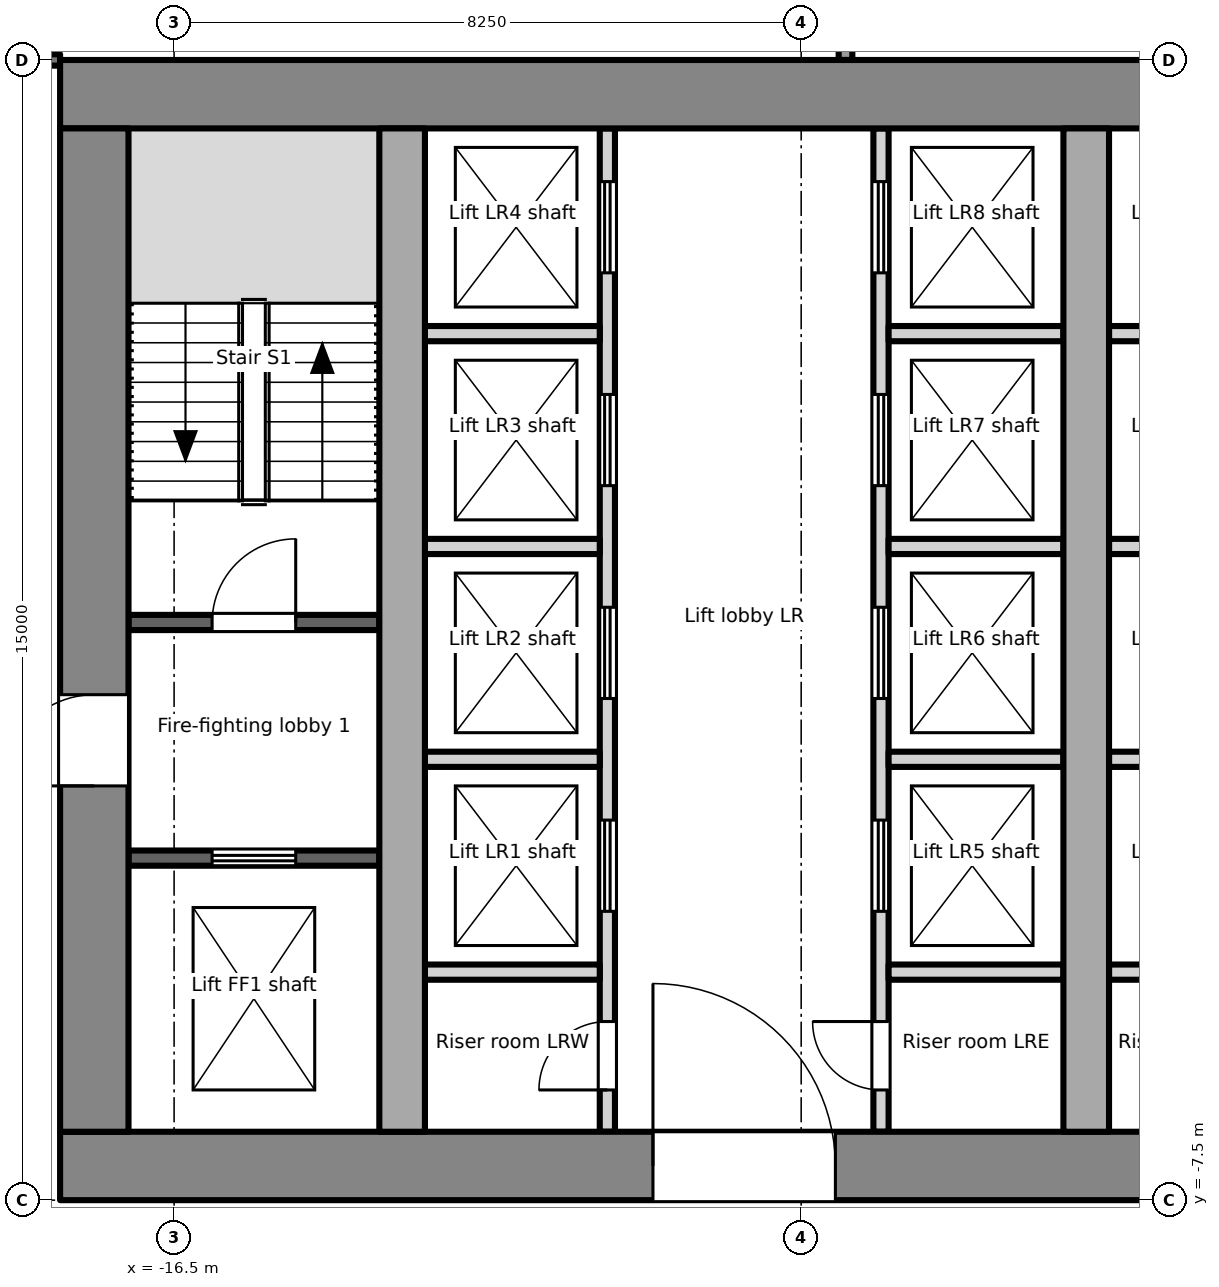
"""IFC4 building model, lengths in metres.
Left out: names, types, materials, properties, quantities, classifications, styles, units other than length and angle.
Written with IfcOpenShell. Run it as: python <this file> out.ifc"""

import sys

from ifc_helpers import new_model, si_unit, direction, frame, frame_2d, origin, place, context, subcontext, project, spatial, rectangle, extrude, element, fill, save


model = new_model("IFC4")
c1 = context("Model", 3, precision=1e-05, world=origin(), true_north=direction((0.0, 1.0)))
c2 = subcontext(c1, "Body", "Model", "MODEL_VIEW")
j1 = project(units=[si_unit("LENGTHUNIT", "METRE"), si_unit("PLANEANGLEUNIT", "RADIAN")], contexts=[c1])
p1 = place(None, origin())
s1 = spatial("IfcSite", under=j1, at=p1, CompositionType="ELEMENT")
p2 = place(p1, origin())
s2 = spatial("IfcBuilding", under=s1, at=p2, CompositionType="ELEMENT")
p3 = place(p2, frame((0.0, 0.0, 150.1)))
s3 = spatial("IfcBuildingStorey", under=s2, at=p3, CompositionType="ELEMENT", Elevation=150.1)
p4 = place(p3, frame((-18.0, -7.05, -0.2), z_axis=(0.0, 0.0, 1.0), x_axis=(1.0, 0.0, 0.0)))
e1 = element("IfcWall", 1, at=p4, inside=s3, PredefinedType="SHEAR", context=c2, shape_type="SweptSolid", body=[
    extrude(rectangle(XDim=36.0, YDim=0.9, at=frame_2d((18.0, 0.0))), origin(), (0.0, 0.0, 1.0), 4.0),
])
p5 = place(p4, frame((7.8, 0.0, 0.2)))
e2 = element("IfcOpeningElement", 2, at=p5, cuts=e1, PredefinedType="OPENING", context=c2, shape_type="SweptSolid", body=[
    extrude(rectangle(XDim=2.4, YDim=2.1, at=frame_2d((1.2, 1.05))), frame((0.0, 0.46, 0.0), z_axis=(0.0, -1.0, 0.0), x_axis=(1.0, 0.0, 0.0)), (0.0, 0.0, 1.0), 0.921),
])
p6 = place(p4, frame((17.4, 0.0, 0.2)))
e3 = element("IfcOpeningElement", 3, at=p6, cuts=e1, PredefinedType="OPENING", context=c2, shape_type="SweptSolid", body=[
    extrude(rectangle(XDim=1.2, YDim=2.1, at=frame_2d((0.6, 1.05))), frame((0.0, 0.46, 0.0), z_axis=(0.0, -1.0, 0.0), x_axis=(1.0, 0.0, 0.0)), (0.0, 0.0, 1.0), 0.921),
])
p7 = place(p4, frame((26.1, 0.0, 0.2)))
e4 = element("IfcOpeningElement", 4, at=p7, cuts=e1, PredefinedType="OPENING", context=c2, shape_type="SweptSolid", body=[
    extrude(rectangle(XDim=2.4, YDim=2.1, at=frame_2d((1.2, 1.05))), frame((0.0, 0.46, 0.0), z_axis=(0.0, -1.0, 0.0), x_axis=(1.0, 0.0, 0.0)), (0.0, 0.0, 1.0), 0.921),
])
p8 = place(p3, frame((-18.0, 7.05, -0.2), z_axis=(0.0, 0.0, 1.0), x_axis=(1.0, 0.0, 0.0)))
e5 = element("IfcWall", 5, at=p8, inside=s3, PredefinedType="SHEAR", context=c2, shape_type="SweptSolid", body=[
    extrude(rectangle(XDim=36.0, YDim=0.9, at=frame_2d((18.0, 0.0))), origin(), (0.0, 0.0, 1.0), 4.0),
])
p9 = place(p3, frame((-17.55, -6.6, -0.2), z_axis=(0.0, 0.0, 1.0), x_axis=(0.0, 1.0, 0.0)))
e6 = element("IfcWall", 6, at=p9, inside=s3, PredefinedType="SHEAR", context=c2, shape_type="SweptSolid", body=[
    extrude(rectangle(XDim=13.2, YDim=0.9, at=frame_2d((6.6, 0.0))), origin(), (0.0, 0.0, 1.0), 4.0),
])
p10 = place(p9, frame((4.55, 0.0, 0.2)))
e7 = element("IfcOpeningElement", 7, at=p10, cuts=e6, PredefinedType="OPENING", context=c2, shape_type="SweptSolid", body=[
    extrude(rectangle(XDim=1.2, YDim=2.1, at=frame_2d((0.6, 1.05))), frame((0.0, 0.46, 0.0), z_axis=(0.0, -1.0, 0.0), x_axis=(1.0, 0.0, 0.0)), (0.0, 0.0, 1.0), 0.921),
])
for number, where, z_axis, x_axis in (
    (8, (-13.5, -6.6, -0.2), (0.0, 0.0, 1.0), (0.0, 1.0, 0.0)),
    (9, (-4.5, -6.6, -0.2), (0.0, 0.0, 1.0), (0.0, 1.0, 0.0)),
):
    element("IfcWall", number, at=place(p3, frame(where, z_axis=z_axis, x_axis=x_axis)), inside=s3, PredefinedType="SHEAR", context=c2, shape_type="SweptSolid", body=[
        extrude(rectangle(XDim=13.2, YDim=0.6, at=frame_2d((6.6, 0.0))), origin(), (0.0, 0.0, 1.0), 4.0),
    ])
p11 = place(p3, frame((-17.1, -3.0, 0.0), z_axis=(0.0, 0.0, 1.0), x_axis=(1.0, 0.0, 0.0)))
e10 = element("IfcWall", 10, at=p11, inside=s3, PredefinedType="PARTITIONING", context=c2, shape_type="SweptSolid", body=[
    extrude(rectangle(XDim=3.3, YDim=0.2, at=frame_2d((1.65, 0.0))), origin(), (0.0, 0.0, 1.0), 3.8),
])
p12 = place(p11, frame((1.1, 0.0, 0.0)))
e11 = element("IfcOpeningElement", 11, at=p12, cuts=e10, PredefinedType="OPENING", context=c2, shape_type="SweptSolid", body=[
    extrude(rectangle(XDim=1.1, YDim=2.1, at=frame_2d((0.55, 1.05))), frame((0.0, 0.111, 0.0), z_axis=(0.0, -1.0, 0.0), x_axis=(1.0, 0.0, 0.0)), (0.0, 0.0, 1.0), 0.221),
])
p13 = place(p3, frame((-17.1, 0.1, 0.0), z_axis=(0.0, 0.0, 1.0), x_axis=(1.0, 0.0, 0.0)))
e12 = element("IfcWall", 12, at=p13, inside=s3, PredefinedType="PARTITIONING", context=c2, shape_type="SweptSolid", body=[
    extrude(rectangle(XDim=3.3, YDim=0.2, at=frame_2d((1.65, 0.0))), origin(), (0.0, 0.0, 1.0), 3.8),
])
p14 = place(p13, frame((1.1, 0.0, 0.0)))
e13 = element("IfcOpeningElement", 13, at=p14, cuts=e12, PredefinedType="OPENING", context=c2, shape_type="SweptSolid", body=[
    extrude(rectangle(XDim=1.1, YDim=2.1, at=frame_2d((0.55, 1.05))), frame((0.0, 0.111, 0.0), z_axis=(0.0, -1.0, 0.0), x_axis=(1.0, 0.0, 0.0)), (0.0, 0.0, 1.0), 0.221),
])
p15 = place(p3, frame((-10.8, -6.6, 0.0), z_axis=(0.0, 0.0, 1.0), x_axis=(0.0, 1.0, 0.0)))
e14 = element("IfcWall", 14, at=p15, inside=s3, PredefinedType="PARTITIONING", context=c2, shape_type="SweptSolid", body=[
    extrude(rectangle(XDim=13.2, YDim=0.2, at=frame_2d((6.6, 0.0))), origin(), (0.0, 0.0, 1.0), 3.8),
])
p16 = place(p15, frame((0.55, 0.0, 0.0)))
e15 = element("IfcOpeningElement", 15, at=p16, cuts=e14, PredefinedType="OPENING", context=c2, shape_type="SweptSolid", body=[
    extrude(rectangle(XDim=0.9, YDim=2.1, at=frame_2d((0.45, 1.05))), frame((0.0, 0.111, 0.0), z_axis=(0.0, -1.0, 0.0), x_axis=(1.0, 0.0, 0.0)), (0.0, 0.0, 1.0), 0.221),
])
p17 = place(p15, frame((2.9, 0.0, 0.0)))
e16 = element("IfcOpeningElement", 16, at=p17, cuts=e14, PredefinedType="OPENING", context=c2, shape_type="SweptSolid", body=[
    extrude(rectangle(XDim=1.2, YDim=2.1, at=frame_2d((0.6, 1.05))), frame((0.0, 0.111, 0.0), z_axis=(0.0, -1.0, 0.0), x_axis=(1.0, 0.0, 0.0)), (0.0, 0.0, 1.0), 0.221),
])
p18 = place(p15, frame((5.7, 0.0, 0.0)))
e17 = element("IfcOpeningElement", 17, at=p18, cuts=e14, PredefinedType="OPENING", context=c2, shape_type="SweptSolid", body=[
    extrude(rectangle(XDim=1.2, YDim=2.1, at=frame_2d((0.6, 1.05))), frame((0.0, 0.111, 0.0), z_axis=(0.0, -1.0, 0.0), x_axis=(1.0, 0.0, 0.0)), (0.0, 0.0, 1.0), 0.221),
])
p19 = place(p15, frame((8.5, 0.0, 0.0)))
e18 = element("IfcOpeningElement", 18, at=p19, cuts=e14, PredefinedType="OPENING", context=c2, shape_type="SweptSolid", body=[
    extrude(rectangle(XDim=1.2, YDim=2.1, at=frame_2d((0.6, 1.05))), frame((0.0, 0.111, 0.0), z_axis=(0.0, -1.0, 0.0), x_axis=(1.0, 0.0, 0.0)), (0.0, 0.0, 1.0), 0.221),
])
p20 = place(p15, frame((11.3, 0.0, 0.0)))
e19 = element("IfcOpeningElement", 19, at=p20, cuts=e14, PredefinedType="OPENING", context=c2, shape_type="SweptSolid", body=[
    extrude(rectangle(XDim=1.2, YDim=2.1, at=frame_2d((0.6, 1.05))), frame((0.0, 0.111, 0.0), z_axis=(0.0, -1.0, 0.0), x_axis=(1.0, 0.0, 0.0)), (0.0, 0.0, 1.0), 0.221),
])
p21 = place(p3, frame((-7.2, -6.6, 0.0), z_axis=(0.0, 0.0, 1.0), x_axis=(0.0, 1.0, 0.0)))
e20 = element("IfcWall", 20, at=p21, inside=s3, PredefinedType="PARTITIONING", context=c2, shape_type="SweptSolid", body=[
    extrude(rectangle(XDim=13.2, YDim=0.2, at=frame_2d((6.6, 0.0))), origin(), (0.0, 0.0, 1.0), 3.8),
])
p22 = place(p21, frame((0.55, 0.0, 0.0)))
e21 = element("IfcOpeningElement", 21, at=p22, cuts=e20, PredefinedType="OPENING", context=c2, shape_type="SweptSolid", body=[
    extrude(rectangle(XDim=0.9, YDim=2.1, at=frame_2d((0.45, 1.05))), frame((0.0, 0.111, 0.0), z_axis=(0.0, -1.0, 0.0), x_axis=(1.0, 0.0, 0.0)), (0.0, 0.0, 1.0), 0.221),
])
p23 = place(p21, frame((2.9, 0.0, 0.0)))
e22 = element("IfcOpeningElement", 22, at=p23, cuts=e20, PredefinedType="OPENING", context=c2, shape_type="SweptSolid", body=[
    extrude(rectangle(XDim=1.2, YDim=2.1, at=frame_2d((0.6, 1.05))), frame((0.0, 0.111, 0.0), z_axis=(0.0, -1.0, 0.0), x_axis=(1.0, 0.0, 0.0)), (0.0, 0.0, 1.0), 0.221),
])
p24 = place(p21, frame((5.7, 0.0, 0.0)))
e23 = element("IfcOpeningElement", 23, at=p24, cuts=e20, PredefinedType="OPENING", context=c2, shape_type="SweptSolid", body=[
    extrude(rectangle(XDim=1.2, YDim=2.1, at=frame_2d((0.6, 1.05))), frame((0.0, 0.111, 0.0), z_axis=(0.0, -1.0, 0.0), x_axis=(1.0, 0.0, 0.0)), (0.0, 0.0, 1.0), 0.221),
])
p25 = place(p21, frame((8.5, 0.0, 0.0)))
e24 = element("IfcOpeningElement", 24, at=p25, cuts=e20, PredefinedType="OPENING", context=c2, shape_type="SweptSolid", body=[
    extrude(rectangle(XDim=1.2, YDim=2.1, at=frame_2d((0.6, 1.05))), frame((0.0, 0.111, 0.0), z_axis=(0.0, -1.0, 0.0), x_axis=(1.0, 0.0, 0.0)), (0.0, 0.0, 1.0), 0.221),
])
p26 = place(p21, frame((11.3, 0.0, 0.0)))
e25 = element("IfcOpeningElement", 25, at=p26, cuts=e20, PredefinedType="OPENING", context=c2, shape_type="SweptSolid", body=[
    extrude(rectangle(XDim=1.2, YDim=2.1, at=frame_2d((0.6, 1.05))), frame((0.0, 0.111, 0.0), z_axis=(0.0, -1.0, 0.0), x_axis=(1.0, 0.0, 0.0)), (0.0, 0.0, 1.0), 0.221),
])
for number, where, z_axis, x_axis in (
    (26, (-13.2, -1.7, 0.0), (0.0, 0.0, 1.0), (1.0, 0.0, 0.0)),
    (27, (-13.2, 1.1, 0.0), (0.0, 0.0, 1.0), (1.0, 0.0, 0.0)),
    (28, (-13.2, 3.9, 0.0), (0.0, 0.0, 1.0), (1.0, 0.0, 0.0)),
    (29, (-13.2, -4.5, 0.0), (0.0, 0.0, 1.0), (1.0, 0.0, 0.0)),
    (30, (-7.1, -1.7, 0.0), (0.0, 0.0, 1.0), (1.0, 0.0, 0.0)),
    (31, (-7.1, 1.1, 0.0), (0.0, 0.0, 1.0), (1.0, 0.0, 0.0)),
    (32, (-7.1, 3.9, 0.0), (0.0, 0.0, 1.0), (1.0, 0.0, 0.0)),
    (33, (-7.1, -4.5, 0.0), (0.0, 0.0, 1.0), (1.0, 0.0, 0.0)),
    (34, (-4.2, -1.7, 0.0), (0.0, 0.0, 1.0), (1.0, 0.0, 0.0)),
    (35, (-4.2, 1.1, 0.0), (0.0, 0.0, 1.0), (1.0, 0.0, 0.0)),
    (36, (-4.2, 3.9, 0.0), (0.0, 0.0, 1.0), (1.0, 0.0, 0.0)),
    (37, (-4.2, -4.5, 0.0), (0.0, 0.0, 1.0), (1.0, 0.0, 0.0)),
):
    element("IfcWall", number, at=place(p3, frame(where, z_axis=z_axis, x_axis=x_axis)), inside=s3, PredefinedType="PARTITIONING", context=c2, shape_type="SweptSolid", body=[
        extrude(rectangle(XDim=2.3, YDim=0.2, at=frame_2d((1.15, 0.0))), origin(), (0.0, 0.0, 1.0), 3.8),
    ])
p27 = place(p3, frame((-20.325, 7.501, 0.0), z_axis=(0.0, 0.0, 1.0), x_axis=(1.0, 0.0, 0.0)))
e38 = element("IfcWall", 38, at=p27, inside=s3, PredefinedType="PARTITIONING", context=c2, shape_type="SweptSolid", body=[
    extrude(rectangle(XDim=2.325, YDim=0.15, at=frame_2d((1.163, 0.0))), origin(), (0.0, 0.0, 1.0), 3.8),
])
p28 = place(p3, frame((-7.667, 12.24, 0.0), z_axis=(0.0, 0.0, 1.0), x_axis=(0.0, -1.0, 0.0)))
e39 = element("IfcWall", 39, at=p28, inside=s3, PredefinedType="PARTITIONING", context=c2, shape_type="SweptSolid", body=[
    extrude(rectangle(XDim=4.74, YDim=0.18, at=frame_2d((2.37, 0.0))), origin(), (0.0, 0.0, 1.0), 3.8),
])
p29 = place(p12, origin())
e40 = element("IfcDoor", 40, at=p29, inside=s3, OperationType="DOUBLE_DOOR_SLIDING", PredefinedType="DOOR", context=c2, shape_type="SweptSolid", body=[
    extrude(rectangle(XDim=1.1, YDim=2.1, at=frame_2d((0.55, 1.05))), frame((0.0, 0.025, 0.0), z_axis=(0.0, -1.0, 0.0), x_axis=(1.0, 0.0, 0.0)), (0.0, 0.0, 1.0), 0.05),
])
fill(e11, e40)
p30 = place(p10, origin())
e41 = element("IfcDoor", 41, at=p30, inside=s3, OperationType="SINGLE_SWING_LEFT", PredefinedType="DOOR", context=c2, shape_type="SweptSolid", body=[
    extrude(rectangle(XDim=1.2, YDim=2.1, at=frame_2d((0.6, 1.05))), frame((0.0, 0.025, 0.0), z_axis=(0.0, -1.0, 0.0), x_axis=(1.0, 0.0, 0.0)), (0.0, 0.0, 1.0), 0.05),
])
fill(e7, e41)
p31 = place(p14, origin())
e42 = element("IfcDoor", 42, at=p31, inside=s3, OperationType="SINGLE_SWING_RIGHT", PredefinedType="DOOR", context=c2, shape_type="SweptSolid", body=[
    extrude(rectangle(XDim=1.1, YDim=2.1, at=frame_2d((0.55, 1.05))), frame((0.0, 0.025, 0.0), z_axis=(0.0, -1.0, 0.0), x_axis=(1.0, 0.0, 0.0)), (0.0, 0.0, 1.0), 0.05),
])
fill(e13, e42)
p32 = place(p16, origin())
e43 = element("IfcDoor", 43, at=p32, inside=s3, OperationType="SINGLE_SWING_LEFT", PredefinedType="DOOR", context=c2, shape_type="SweptSolid", body=[
    extrude(rectangle(XDim=0.9, YDim=2.1, at=frame_2d((0.45, 1.05))), frame((0.0, 0.025, 0.0), z_axis=(0.0, -1.0, 0.0), x_axis=(1.0, 0.0, 0.0)), (0.0, 0.0, 1.0), 0.05),
])
fill(e15, e43)
p33 = place(p17, origin())
e44 = element("IfcDoor", 44, at=p33, inside=s3, OperationType="DOUBLE_DOOR_SLIDING", PredefinedType="DOOR", context=c2, shape_type="SweptSolid", body=[
    extrude(rectangle(XDim=1.2, YDim=2.1, at=frame_2d((0.6, 1.05))), frame((0.0, 0.025, 0.0), z_axis=(0.0, -1.0, 0.0), x_axis=(1.0, 0.0, 0.0)), (0.0, 0.0, 1.0), 0.05),
])
fill(e16, e44)
p34 = place(p18, origin())
e45 = element("IfcDoor", 45, at=p34, inside=s3, OperationType="DOUBLE_DOOR_SLIDING", PredefinedType="DOOR", context=c2, shape_type="SweptSolid", body=[
    extrude(rectangle(XDim=1.2, YDim=2.1, at=frame_2d((0.6, 1.05))), frame((0.0, 0.025, 0.0), z_axis=(0.0, -1.0, 0.0), x_axis=(1.0, 0.0, 0.0)), (0.0, 0.0, 1.0), 0.05),
])
fill(e17, e45)
p35 = place(p19, origin())
e46 = element("IfcDoor", 46, at=p35, inside=s3, OperationType="DOUBLE_DOOR_SLIDING", PredefinedType="DOOR", context=c2, shape_type="SweptSolid", body=[
    extrude(rectangle(XDim=1.2, YDim=2.1, at=frame_2d((0.6, 1.05))), frame((0.0, 0.025, 0.0), z_axis=(0.0, -1.0, 0.0), x_axis=(1.0, 0.0, 0.0)), (0.0, 0.0, 1.0), 0.05),
])
fill(e18, e46)
p36 = place(p20, origin())
e47 = element("IfcDoor", 47, at=p36, inside=s3, OperationType="DOUBLE_DOOR_SLIDING", PredefinedType="DOOR", context=c2, shape_type="SweptSolid", body=[
    extrude(rectangle(XDim=1.2, YDim=2.1, at=frame_2d((0.6, 1.05))), frame((0.0, 0.025, 0.0), z_axis=(0.0, -1.0, 0.0), x_axis=(1.0, 0.0, 0.0)), (0.0, 0.0, 1.0), 0.05),
])
fill(e19, e47)
p37 = place(p22, origin())
e48 = element("IfcDoor", 48, at=p37, inside=s3, OperationType="SINGLE_SWING_RIGHT", PredefinedType="DOOR", context=c2, shape_type="SweptSolid", body=[
    extrude(rectangle(XDim=0.9, YDim=2.1, at=frame_2d((0.45, 1.05))), frame((0.0, 0.025, 0.0), z_axis=(0.0, -1.0, 0.0), x_axis=(1.0, 0.0, 0.0)), (0.0, 0.0, 1.0), 0.05),
])
fill(e21, e48)
p38 = place(p23, origin())
e49 = element("IfcDoor", 49, at=p38, inside=s3, OperationType="DOUBLE_DOOR_SLIDING", PredefinedType="DOOR", context=c2, shape_type="SweptSolid", body=[
    extrude(rectangle(XDim=1.2, YDim=2.1, at=frame_2d((0.6, 1.05))), frame((0.0, 0.025, 0.0), z_axis=(0.0, -1.0, 0.0), x_axis=(1.0, 0.0, 0.0)), (0.0, 0.0, 1.0), 0.05),
])
fill(e22, e49)
p39 = place(p24, origin())
e50 = element("IfcDoor", 50, at=p39, inside=s3, OperationType="DOUBLE_DOOR_SLIDING", PredefinedType="DOOR", context=c2, shape_type="SweptSolid", body=[
    extrude(rectangle(XDim=1.2, YDim=2.1, at=frame_2d((0.6, 1.05))), frame((0.0, 0.025, 0.0), z_axis=(0.0, -1.0, 0.0), x_axis=(1.0, 0.0, 0.0)), (0.0, 0.0, 1.0), 0.05),
])
fill(e23, e50)
p40 = place(p25, origin())
e51 = element("IfcDoor", 51, at=p40, inside=s3, OperationType="DOUBLE_DOOR_SLIDING", PredefinedType="DOOR", context=c2, shape_type="SweptSolid", body=[
    extrude(rectangle(XDim=1.2, YDim=2.1, at=frame_2d((0.6, 1.05))), frame((0.0, 0.025, 0.0), z_axis=(0.0, -1.0, 0.0), x_axis=(1.0, 0.0, 0.0)), (0.0, 0.0, 1.0), 0.05),
])
fill(e24, e51)
p41 = place(p26, origin())
e52 = element("IfcDoor", 52, at=p41, inside=s3, OperationType="DOUBLE_DOOR_SLIDING", PredefinedType="DOOR", context=c2, shape_type="SweptSolid", body=[
    extrude(rectangle(XDim=1.2, YDim=2.1, at=frame_2d((0.6, 1.05))), frame((0.0, 0.025, 0.0), z_axis=(0.0, -1.0, 0.0), x_axis=(1.0, 0.0, 0.0)), (0.0, 0.0, 1.0), 0.05),
])
fill(e25, e52)
p42 = place(p5, origin())
e53 = element("IfcDoor", 53, at=p42, inside=s3, OperationType="DOUBLE_DOOR_DOUBLE_SWING", PredefinedType="DOOR", context=c2, shape_type="SweptSolid", body=[
    extrude(rectangle(XDim=2.4, YDim=2.1, at=frame_2d((1.2, 1.05))), frame((0.0, 0.025, 0.0), z_axis=(0.0, -1.0, 0.0), x_axis=(1.0, 0.0, 0.0)), (0.0, 0.0, 1.0), 0.05),
])
fill(e2, e53)
save(model, sys.argv[1])
